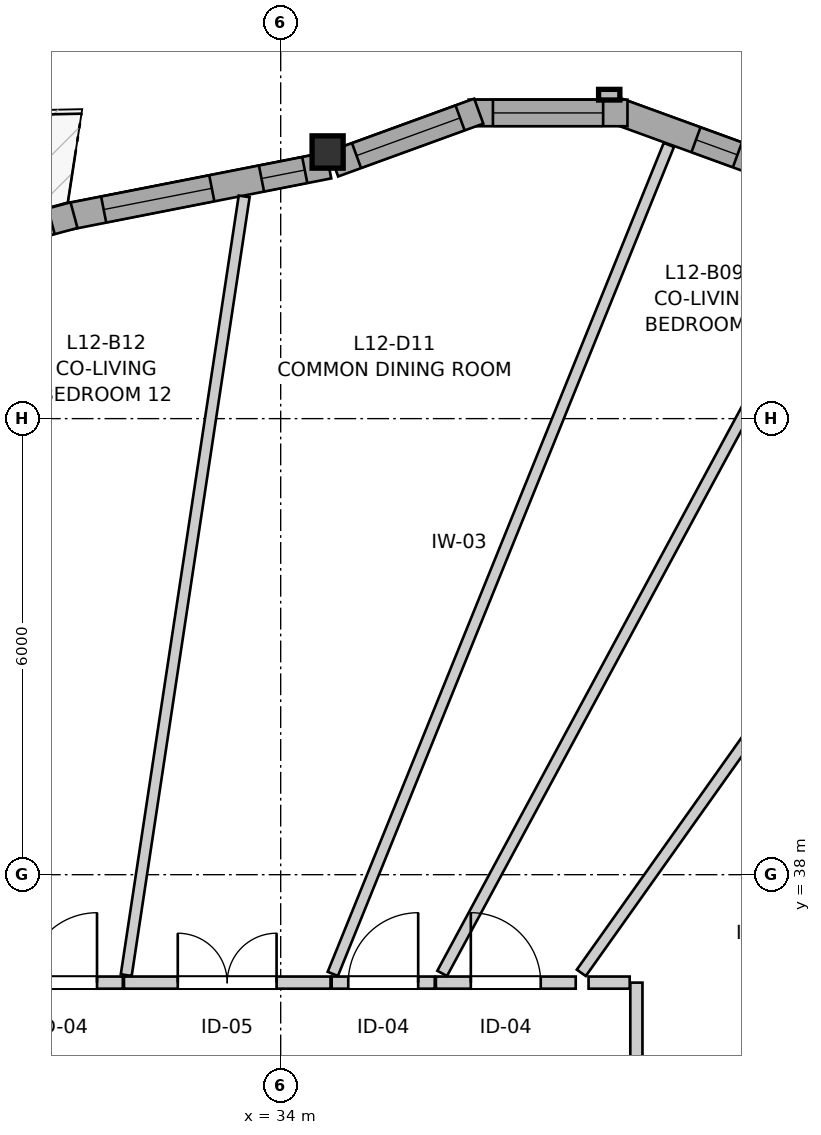
"""IFC4 building model, lengths in metres.
Left out: names, types, materials, properties, quantities, classifications, styles, units other than length and angle.
Written with IfcOpenShell. Run it as: python <this file> out.ifc"""

import sys

from ifc_helpers import new_model, si_unit, direction, frame, frame_2d, origin, origin_2d, place, context, subcontext, project, spatial, rectangle, i_section, extrude, source, transform, mapped, element, fill, save


model = new_model("IFC4")
c1 = context("Model", 3, precision=1e-05, world=origin(), true_north=direction((0.0, 1.0)))
c2 = subcontext(c1, "Body", "Model", "MODEL_VIEW")
j1 = project(units=[si_unit("LENGTHUNIT", "METRE"), si_unit("PLANEANGLEUNIT", "RADIAN")], contexts=[c1])
p1 = place(None, origin())
s1 = spatial("IfcSite", under=j1, at=p1, CompositionType="ELEMENT")
p2 = place(p1, origin())
s2 = spatial("IfcBuilding", under=s1, at=p2, CompositionType="ELEMENT")
p3 = place(p2, frame((0.0, 0.0, 43.0)))
s3 = spatial("IfcBuildingStorey", under=s2, at=p3, CompositionType="ELEMENT", Elevation=43.0)
m1 = source(origin(), c2, "Body", "SweptSolid", [
    extrude(i_section(OverallWidth=0.409, OverallDepth=0.425, WebThickness=0.03, FlangeThickness=0.048, FilletRadius=0.015, at=origin_2d()), origin(), (0.0, 0.0, 1.0), 2.94),
])
p4 = place(p3, frame((34.617, 47.508, 0.0), z_axis=(0.0, 0.0, 1.0), x_axis=(1.0, 0.0, 0.0)))
e1 = element("IfcColumn", 1, at=p4, inside=s3, PredefinedType="PILASTER", context=c2, shape_type="MappedRepresentation", body=[
    mapped(m1, transform((0.0, 0.0, 0.0), x_axis=(1.0, 0.0, 0.0), y_axis=(0.0, 1.0, 0.0), z_axis=(0.0, 0.0, 1.0), scale=1.0)),
])
p5 = place(p3, frame((40.393, 47.33, 0.0), z_axis=(0.0, 0.0, 1.0), x_axis=(-0.939660353162, 0.342108784886, 0.0)))
e2 = element("IfcWall", 2, at=p5, inside=s3, PredefinedType="SOLIDWALL", context=c2, shape_type="SweptSolid", body=[
    extrude(rectangle(XDim=2.09, YDim=0.35, at=frame_2d((1.045, 0.0))), origin(), (0.0, 0.0, 1.0), 2.42),
])
p6 = place(p5, frame((0.409, 0.0, 0.82)))
e3 = element("IfcOpeningElement", 3, at=p6, cuts=e2, PredefinedType="OPENING", context=c2, shape_type="SweptSolid", body=[
    extrude(rectangle(XDim=0.58, YDim=1.35, at=frame_2d((0.29, 0.675))), frame((0.0, 0.185, 0.0), z_axis=(0.0, -1.0, 0.0), x_axis=(1.0, 0.0, 0.0)), (0.0, 0.0, 1.0), 0.37),
])
p7 = place(p3, frame((38.563, 48.022, 0.0), z_axis=(0.0, 0.0, 1.0), x_axis=(-1.0, 0.0, 0.0)))
e4 = element("IfcWall", 4, at=p7, inside=s3, PredefinedType="SOLIDWALL", context=c2, shape_type="SweptSolid", body=[
    extrude(rectangle(XDim=2.09, YDim=0.35, at=frame_2d((1.045, 0.0))), origin(), (0.0, 0.0, 1.0), 2.42),
])
p8 = place(p7, frame((0.32, 0.0, 0.82)))
e5 = element("IfcOpeningElement", 5, at=p8, cuts=e4, PredefinedType="OPENING", context=c2, shape_type="SweptSolid", body=[
    extrude(rectangle(XDim=1.45, YDim=1.25, at=frame_2d((0.725, 0.625))), frame((0.0, 0.185, 0.0), z_axis=(0.0, -1.0, 0.0), x_axis=(1.0, 0.0, 0.0)), (0.0, 0.0, 1.0), 0.37),
])
p9 = place(p3, frame((36.606, 48.045, 0.0), z_axis=(0.0, 0.0, 1.0), x_axis=(-0.939653047052, -0.342128851701, 0.0)))
e6 = element("IfcWall", 6, at=p9, inside=s3, PredefinedType="SOLIDWALL", context=c2, shape_type="SweptSolid", body=[
    extrude(rectangle(XDim=2.032, YDim=0.35, at=frame_2d((1.016, 0.0))), origin(), (0.0, 0.0, 1.0), 2.42),
])
p10 = place(p9, frame((0.261, 0.0, 0.82)))
e7 = element("IfcOpeningElement", 7, at=p10, cuts=e6, PredefinedType="OPENING", context=c2, shape_type="SweptSolid", body=[
    extrude(rectangle(XDim=1.45, YDim=1.25, at=frame_2d((0.725, 0.625))), frame((0.0, 0.185, 0.0), z_axis=(0.0, -1.0, 0.0), x_axis=(1.0, 0.0, 0.0)), (0.0, 0.0, 1.0), 0.37),
])
p11 = place(p3, frame((34.632, 47.332, 0.0), z_axis=(0.0, 0.0, 1.0), x_axis=(-0.981234691866, -0.192817217796, 0.0)))
e8 = element("IfcWall", 8, at=p11, inside=s3, PredefinedType="SOLIDWALL", context=c2, shape_type="SweptSolid", body=[
    extrude(rectangle(XDim=3.502, YDim=0.35, at=frame_2d((1.751, 0.0))), origin(), (0.0, 0.0, 1.0), 2.42),
])
p12 = place(p11, frame((0.321, 0.0, 0.82)))
e9 = element("IfcOpeningElement", 9, at=p12, cuts=e8, PredefinedType="OPENING", context=c2, shape_type="SweptSolid", body=[
    extrude(rectangle(XDim=0.58, YDim=1.35, at=frame_2d((0.29, 0.675))), frame((0.0, 0.185, 0.0), z_axis=(0.0, -1.0, 0.0), x_axis=(1.0, 0.0, 0.0)), (0.0, 0.0, 1.0), 0.37),
])
p13 = place(p11, frame((1.567, 0.0, 0.82)))
e10 = element("IfcOpeningElement", 10, at=p13, cuts=e8, PredefinedType="OPENING", context=c2, shape_type="SweptSolid", body=[
    extrude(rectangle(XDim=1.45, YDim=1.25, at=frame_2d((0.725, 0.625))), frame((0.0, 0.185, 0.0), z_axis=(0.0, -1.0, 0.0), x_axis=(1.0, 0.0, 0.0)), (0.0, 0.0, 1.0), 0.37),
])
p14 = place(p3, frame((31.281, 46.677, 0.0), z_axis=(0.0, 0.0, 1.0), x_axis=(-0.965445661484, -0.260604441101, 0.0)))
e11 = element("IfcWall", 11, at=p14, inside=s3, PredefinedType="SOLIDWALL", context=c2, shape_type="SweptSolid", body=[
    extrude(rectangle(XDim=3.15, YDim=0.35, at=frame_2d((1.575, 0.0))), origin(), (0.0, 0.0, 1.0), 2.42),
])
p15 = place(p14, frame((0.31, 0.0, 0.82)))
e12 = element("IfcOpeningElement", 12, at=p15, cuts=e11, PredefinedType="OPENING", context=c2, shape_type="SweptSolid", body=[
    extrude(rectangle(XDim=0.58, YDim=1.35, at=frame_2d((0.29, 0.675))), frame((0.0, 0.185, 0.0), z_axis=(0.0, -1.0, 0.0), x_axis=(1.0, 0.0, 0.0)), (0.0, 0.0, 1.0), 0.37),
])
p16 = place(p14, frame((1.215, 0.0, 0.82)))
e13 = element("IfcOpeningElement", 13, at=p16, cuts=e11, PredefinedType="OPENING", context=c2, shape_type="SweptSolid", body=[
    extrude(rectangle(XDim=1.45, YDim=1.25, at=frame_2d((0.725, 0.625))), frame((0.0, 0.185, 0.0), z_axis=(0.0, -1.0, 0.0), x_axis=(1.0, 0.0, 0.0)), (0.0, 0.0, 1.0), 0.37),
])
p17 = place(p3, frame((38.68, 36.58, 0.0), z_axis=(0.0, 0.0, 1.0), x_axis=(0.0, -1.0, 0.0)))
e14 = element("IfcWall", 14, at=p17, inside=s3, PredefinedType="PARTITIONING", context=c2, shape_type="SweptSolid", body=[
    extrude(rectangle(XDim=3.069, YDim=0.16, at=frame_2d((1.535, 0.0))), origin(), (0.0, 0.0, 1.0), 2.94),
])
p18 = place(p17, frame((1.092, 0.0, 0.0)))
e15 = element("IfcOpeningElement", 15, at=p18, cuts=e14, PredefinedType="OPENING", context=c2, shape_type="SweptSolid", body=[
    extrude(rectangle(XDim=0.92, YDim=2.1, at=frame_2d((0.46, 1.05))), frame((0.0, 0.09, 0.0), z_axis=(0.0, -1.0, 0.0), x_axis=(1.0, 0.0, 0.0)), (0.0, 0.0, 1.0), 0.18),
])
p19 = place(p3, frame((31.938, 36.58, 0.0), z_axis=(0.0, 0.0, 1.0), x_axis=(1.0, 0.0, 0.0)))
e16 = element("IfcWall", 16, at=p19, inside=s3, PredefinedType="PARTITIONING", context=c2, shape_type="SweptSolid", body=[
    extrude(rectangle(XDim=2.718, YDim=0.16, at=frame_2d((1.359, 0.0))), origin(), (0.0, 0.0, 1.0), 2.94),
])
p20 = place(p19, frame((0.708, 0.0, 0.0)))
e17 = element("IfcOpeningElement", 17, at=p20, cuts=e16, PredefinedType="OPENING", context=c2, shape_type="SweptSolid", body=[
    extrude(rectangle(XDim=1.3, YDim=2.1, at=frame_2d((0.65, 1.05))), frame((0.0, 0.09, 0.0), z_axis=(0.0, -1.0, 0.0), x_axis=(1.0, 0.0, 0.0)), (0.0, 0.0, 1.0), 0.18),
])
p21 = place(p3, frame((36.042, 36.58, 0.0), z_axis=(0.0, 0.0, 1.0), x_axis=(1.0, 0.0, 0.0)))
e18 = element("IfcWall", 18, at=p21, inside=s3, PredefinedType="PARTITIONING", context=c2, shape_type="SweptSolid", body=[
    extrude(rectangle(XDim=1.84, YDim=0.16, at=frame_2d((0.92, 0.0))), origin(), (0.0, 0.0, 1.0), 2.94),
])
p22 = place(p21, frame((0.459, 0.0, 0.0)))
e19 = element("IfcOpeningElement", 19, at=p22, cuts=e18, PredefinedType="OPENING", context=c2, shape_type="SweptSolid", body=[
    extrude(rectangle(XDim=0.92, YDim=2.1, at=frame_2d((0.46, 1.05))), frame((0.0, 0.09, 0.0), z_axis=(0.0, -1.0, 0.0), x_axis=(1.0, 0.0, 0.0)), (0.0, 0.0, 1.0), 0.18),
])
p23 = place(p3, frame((30.324, 36.58, 0.0), z_axis=(0.0, 0.0, 1.0), x_axis=(1.0, 0.0, 0.0)))
e20 = element("IfcWall", 20, at=p23, inside=s3, PredefinedType="PARTITIONING", context=c2, shape_type="SweptSolid", body=[
    extrude(rectangle(XDim=1.599, YDim=0.16, at=frame_2d((0.8, 0.0))), origin(), (0.0, 0.0, 1.0), 2.94),
])
p24 = place(p23, frame((0.34, 0.0, 0.0)))
e21 = element("IfcOpeningElement", 21, at=p24, cuts=e20, PredefinedType="OPENING", context=c2, shape_type="SweptSolid", body=[
    extrude(rectangle(XDim=0.92, YDim=2.1, at=frame_2d((0.46, 1.05))), frame((0.0, 0.09, 0.0), z_axis=(0.0, -1.0, 0.0), x_axis=(1.0, 0.0, 0.0)), (0.0, 0.0, 1.0), 0.18),
])
p25 = place(p3, frame((34.671, 36.58, 0.0), z_axis=(0.0, 0.0, 1.0), x_axis=(1.0, 0.0, 0.0)))
e22 = element("IfcWall", 22, at=p25, inside=s3, PredefinedType="PARTITIONING", context=c2, shape_type="SweptSolid", body=[
    extrude(rectangle(XDim=1.356, YDim=0.16, at=frame_2d((0.678, 0.0))), origin(), (0.0, 0.0, 1.0), 2.94),
])
p26 = place(p25, frame((0.218, 0.0, 0.0)))
e23 = element("IfcOpeningElement", 23, at=p26, cuts=e22, PredefinedType="OPENING", context=c2, shape_type="SweptSolid", body=[
    extrude(rectangle(XDim=0.92, YDim=2.1, at=frame_2d((0.46, 1.05))), frame((0.0, 0.09, 0.0), z_axis=(0.0, -1.0, 0.0), x_axis=(1.0, 0.0, 0.0)), (0.0, 0.0, 1.0), 0.18),
])
p27 = place(p3, frame((34.686, 36.695, 0.0), z_axis=(0.0, 0.0, 1.0), x_axis=(0.375735926904, 0.926726773776, 0.0)))
e24 = element("IfcWall", 24, at=p27, inside=s3, PredefinedType="PARTITIONING", context=c2, shape_type="SweptSolid", body=[
    extrude(rectangle(XDim=11.769, YDim=0.145, at=frame_2d((5.884, 0.0))), origin(), (0.0, 0.0, 1.0), 2.94),
])
p28 = place(p3, frame((36.125, 36.701, 0.0), z_axis=(0.0, 0.0, 1.0), x_axis=(0.474948586069, 0.880013545686, 0.0)))
e25 = element("IfcWall", 25, at=p28, inside=s3, PredefinedType="PARTITIONING", context=c2, shape_type="SweptSolid", body=[
    extrude(rectangle(XDim=10.889, YDim=0.145, at=frame_2d((5.445, 0.0))), origin(), (0.0, 0.0, 1.0), 2.94),
])
p29 = place(p3, frame((31.968, 36.679, 0.0), z_axis=(0.0, 0.0, 1.0), x_axis=(0.149735581821, 0.9887260771, 0.0)))
e26 = element("IfcWall", 26, at=p29, inside=s3, PredefinedType="PARTITIONING", context=c2, shape_type="SweptSolid", body=[
    extrude(rectangle(XDim=10.362, YDim=0.145, at=frame_2d((5.181, 0.0))), origin(), (0.0, 0.0, 1.0), 2.94),
])
p30 = place(p3, frame((37.955, 36.708, 0.0), z_axis=(0.0, 0.0, 1.0), x_axis=(0.578991718582, 0.81533342248, 0.0)))
e27 = element("IfcWall", 27, at=p30, inside=s3, PredefinedType="PARTITIONING", context=c2, shape_type="SweptSolid", body=[
    extrude(rectangle(XDim=8.325, YDim=0.145, at=frame_2d((4.163, 0.0))), origin(), (0.0, 0.0, 1.0), 2.94),
])
p31 = place(p3, frame((38.814, 33.597, 0.0), z_axis=(0.0, 0.0, 1.0), x_axis=(0.74417856937, 0.667980730927, 0.0)))
e28 = element("IfcWall", 28, at=p31, inside=s3, PredefinedType="PARTITIONING", context=c2, shape_type="SweptSolid", body=[
    extrude(rectangle(XDim=4.005, YDim=0.145, at=frame_2d((2.002, 0.0))), origin(), (0.0, 0.0, 1.0), 2.94),
])
p32 = place(p3, frame((38.051, 36.58, 0.0), z_axis=(0.0, 0.0, 1.0), x_axis=(1.0, 0.0, 0.0)))
e29 = element("IfcWall", 29, at=p32, inside=s3, PredefinedType="PARTITIONING", context=c2, shape_type="SweptSolid", body=[
    extrude(rectangle(XDim=0.541, YDim=0.16, at=frame_2d((0.271, 0.0))), origin(), (0.0, 0.0, 1.0), 2.94),
])
m2 = source(origin(), c2, "Body", "SweptSolid", [
    extrude(rectangle(XDim=0.58, YDim=1.35, at=frame_2d((0.29, 0.675))), frame((0.0, 0.03, 0.0), z_axis=(0.0, -1.0, 0.0), x_axis=(1.0, 0.0, 0.0)), (0.0, 0.0, 1.0), 0.06),
])
p33 = place(p6, origin())
e30 = element("IfcWindow", 30, at=p33, inside=s3, PartitioningType="SINGLE_PANEL", PredefinedType="WINDOW", context=c2, shape_type="MappedRepresentation", body=[
    mapped(m2, transform((0.0, 0.0, 0.0), x_axis=(1.0, 0.0, 0.0), y_axis=(0.0, 1.0, 0.0), z_axis=(0.0, 0.0, 1.0), scale=1.0)),
])
fill(e3, e30)
m3 = source(origin(), c2, "Body", "SweptSolid", [
    extrude(rectangle(XDim=1.45, YDim=1.25, at=frame_2d((0.725, 0.625))), frame((0.0, 0.03, 0.0), z_axis=(0.0, -1.0, 0.0), x_axis=(1.0, 0.0, 0.0)), (0.0, 0.0, 1.0), 0.06),
])
p34 = place(p8, origin())
e31 = element("IfcWindow", 31, at=p34, inside=s3, PartitioningType="SINGLE_PANEL", PredefinedType="WINDOW", context=c2, shape_type="MappedRepresentation", body=[
    mapped(m3, transform((0.0, 0.0, 0.0), x_axis=(1.0, 0.0, 0.0), y_axis=(0.0, 1.0, 0.0), z_axis=(0.0, 0.0, 1.0), scale=1.0)),
])
fill(e5, e31)
p35 = place(p10, origin())
e32 = element("IfcWindow", 32, at=p35, inside=s3, PartitioningType="SINGLE_PANEL", PredefinedType="WINDOW", context=c2, shape_type="MappedRepresentation", body=[
    mapped(m3, transform((0.0, 0.0, 0.0), x_axis=(1.0, 0.0, 0.0), y_axis=(0.0, 1.0, 0.0), z_axis=(0.0, 0.0, 1.0), scale=1.0)),
])
fill(e7, e32)
p36 = place(p12, origin())
e33 = element("IfcWindow", 33, at=p36, inside=s3, PartitioningType="SINGLE_PANEL", PredefinedType="WINDOW", context=c2, shape_type="MappedRepresentation", body=[
    mapped(m2, transform((0.0, 0.0, 0.0), x_axis=(1.0, 0.0, 0.0), y_axis=(0.0, 1.0, 0.0), z_axis=(0.0, 0.0, 1.0), scale=1.0)),
])
fill(e9, e33)
p37 = place(p13, origin())
e34 = element("IfcWindow", 34, at=p37, inside=s3, PartitioningType="SINGLE_PANEL", PredefinedType="WINDOW", context=c2, shape_type="MappedRepresentation", body=[
    mapped(m3, transform((0.0, 0.0, 0.0), x_axis=(1.0, 0.0, 0.0), y_axis=(0.0, 1.0, 0.0), z_axis=(0.0, 0.0, 1.0), scale=1.0)),
])
fill(e10, e34)
m4 = source(origin(), c2, "Body", "SweptSolid", [
    extrude(rectangle(XDim=1.3, YDim=2.1, at=frame_2d((0.65, 1.05))), frame((0.0, 0.025, 0.0), z_axis=(0.0, -1.0, 0.0), x_axis=(1.0, 0.0, 0.0)), (0.0, 0.0, 1.0), 0.05),
])
p38 = place(p20, origin())
e35 = element("IfcDoor", 35, at=p38, inside=s3, OperationType="DOUBLE_DOOR_SINGLE_SWING", PredefinedType="DOOR", context=c2, shape_type="MappedRepresentation", body=[
    mapped(m4, transform((0.0, 0.0, 0.0), x_axis=(1.0, 0.0, 0.0), y_axis=(0.0, 1.0, 0.0), z_axis=(0.0, 0.0, 1.0), scale=1.0)),
])
fill(e17, e35)
m5 = source(origin(), c2, "Body", "SweptSolid", [
    extrude(rectangle(XDim=0.92, YDim=2.1, at=frame_2d((0.46, 1.05))), frame((0.0, 0.025, 0.0), z_axis=(0.0, -1.0, 0.0), x_axis=(1.0, 0.0, 0.0)), (0.0, 0.0, 1.0), 0.05),
])
p39 = place(p22, origin())
e36 = element("IfcDoor", 36, at=p39, inside=s3, OperationType="SINGLE_SWING_LEFT", PredefinedType="DOOR", context=c2, shape_type="MappedRepresentation", body=[
    mapped(m5, transform((0.0, 0.0, 0.0), x_axis=(1.0, 0.0, 0.0), y_axis=(0.0, 1.0, 0.0), z_axis=(0.0, 0.0, 1.0), scale=1.0)),
])
fill(e19, e36)
p40 = place(p24, origin())
e37 = element("IfcDoor", 37, at=p40, inside=s3, OperationType="SINGLE_SWING_RIGHT", PredefinedType="DOOR", context=c2, shape_type="MappedRepresentation", body=[
    mapped(m5, transform((0.0, 0.0, 0.0), x_axis=(1.0, 0.0, 0.0), y_axis=(0.0, 1.0, 0.0), z_axis=(0.0, 0.0, 1.0), scale=1.0)),
])
fill(e21, e37)
p41 = place(p26, origin())
e38 = element("IfcDoor", 38, at=p41, inside=s3, OperationType="SINGLE_SWING_RIGHT", PredefinedType="DOOR", context=c2, shape_type="MappedRepresentation", body=[
    mapped(m5, transform((0.0, 0.0, 0.0), x_axis=(1.0, 0.0, 0.0), y_axis=(0.0, 1.0, 0.0), z_axis=(0.0, 0.0, 1.0), scale=1.0)),
])
fill(e23, e38)
save(model, sys.argv[1])
